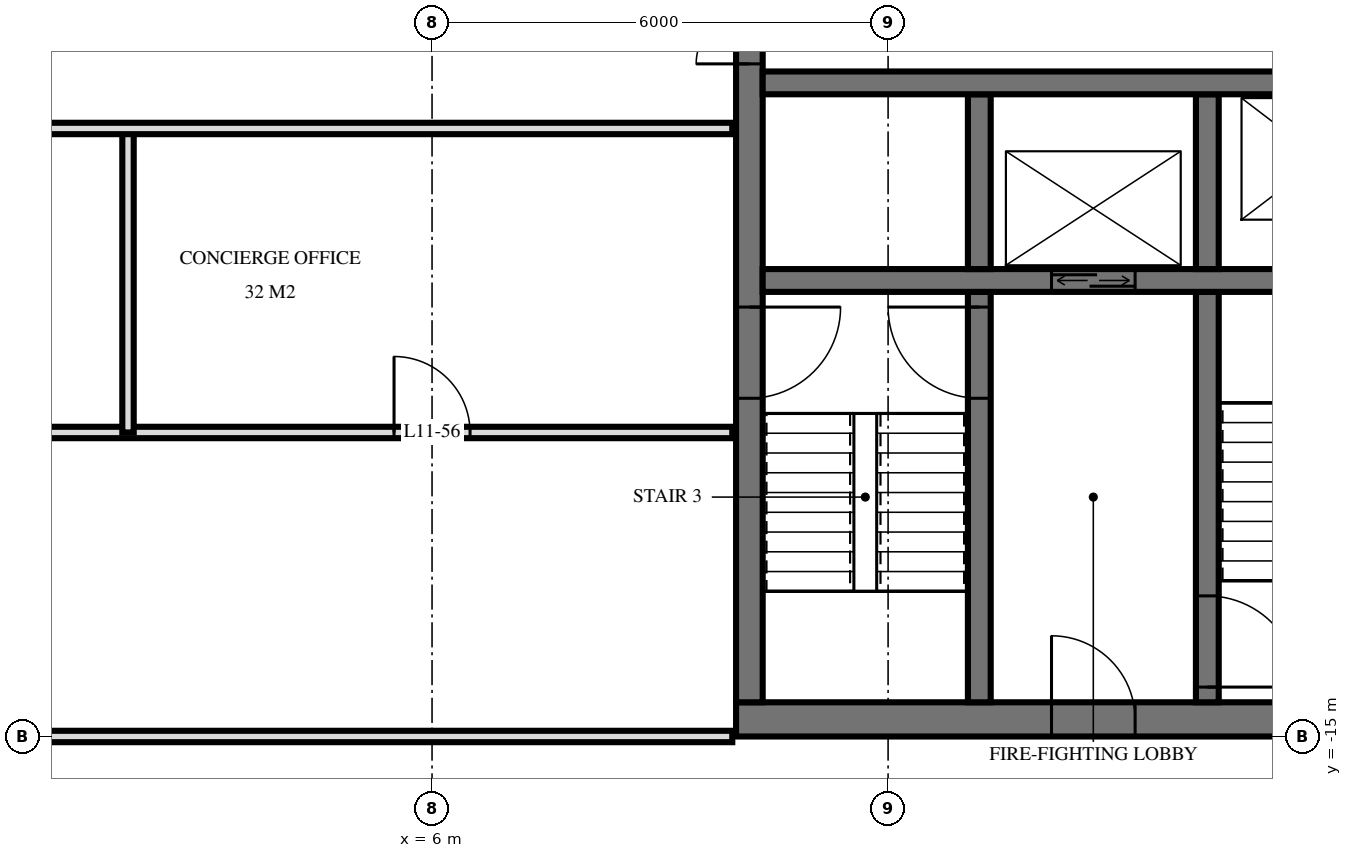
"""IFC4 building model, lengths in metres.
Left out: names, types, materials, properties, quantities, classifications, styles, units other than length and angle.
Written with IfcOpenShell. Run it as: python <this file> out.ifc"""

import sys

from ifc_helpers import new_model, si_unit, direction, frame, frame_2d, origin, place, context, subcontext, project, spatial, rectangle, extrude, element, fill, save


model = new_model("IFC4")
c1 = context("Model", 3, precision=1e-05, world=origin(), true_north=direction((0.0, 1.0)))
c2 = subcontext(c1, "Body", "Model", "MODEL_VIEW")
j1 = project(units=[si_unit("LENGTHUNIT", "METRE"), si_unit("PLANEANGLEUNIT", "RADIAN")], contexts=[c1])
p1 = place(None, origin())
s1 = spatial("IfcSite", under=j1, at=p1, CompositionType="ELEMENT")
p2 = place(p1, origin())
s2 = spatial("IfcBuilding", under=s1, at=p2, CompositionType="ELEMENT")
p3 = place(p2, frame((0.0, 0.0, 49.2)))
s3 = spatial("IfcBuildingStorey", under=s2, at=p3, CompositionType="ELEMENT", Elevation=49.2)
p4 = place(p3, frame((10.0, -14.775, 0.0), z_axis=(0.0, 0.0, 1.0), x_axis=(1.0, 0.0, 0.0)))
e1 = element("IfcWall", 1, at=p4, inside=s3, PredefinedType="SHEAR", context=c2, shape_type="SweptSolid", body=[
    extrude(rectangle(XDim=19.5, YDim=0.45, at=frame_2d((9.75, 0.0))), origin(), (0.0, 0.0, 1.0), 3.6),
])
p5 = place(p4, frame((7.1, 0.0, 0.0)))
e2 = element("IfcOpeningElement", 2, at=p5, cuts=e1, PredefinedType="OPENING", context=c2, shape_type="SweptSolid", body=[
    extrude(rectangle(XDim=1.2, YDim=2.1, at=frame_2d((0.6, 1.05))), frame((0.0, 0.235, 0.0), z_axis=(0.0, -1.0, 0.0), x_axis=(1.0, 0.0, 0.0)), (0.0, 0.0, 1.0), 0.47),
])
p6 = place(p4, frame((4.15, 0.0, 0.0)))
e3 = element("IfcOpeningElement", 3, at=p6, cuts=e1, PredefinedType="OPENING", context=c2, shape_type="SweptSolid", body=[
    extrude(rectangle(XDim=1.1, YDim=2.1, at=frame_2d((0.55, 1.05))), frame((0.0, 0.235, 0.0), z_axis=(0.0, -1.0, 0.0), x_axis=(1.0, 0.0, 0.0)), (0.0, 0.0, 1.0), 0.47),
])
p7 = place(p4, frame((10.1, 0.0, 0.0)))
e4 = element("IfcOpeningElement", 4, at=p7, cuts=e1, PredefinedType="OPENING", context=c2, shape_type="SweptSolid", body=[
    extrude(rectangle(XDim=0.9, YDim=2.1, at=frame_2d((0.45, 1.05))), frame((0.0, 0.235, 0.0), z_axis=(0.0, -1.0, 0.0), x_axis=(1.0, 0.0, 0.0)), (0.0, 0.0, 1.0), 0.47),
])
p8 = place(p4, frame((12.45, 0.0, 0.0)))
e5 = element("IfcOpeningElement", 5, at=p8, cuts=e1, PredefinedType="OPENING", context=c2, shape_type="SweptSolid", body=[
    extrude(rectangle(XDim=1.0, YDim=2.1, at=frame_2d((0.5, 1.05))), frame((0.0, 0.235, 0.0), z_axis=(0.0, -1.0, 0.0), x_axis=(1.0, 0.0, 0.0)), (0.0, 0.0, 1.0), 0.47),
])
p9 = place(p4, frame((14.913, 0.0, 0.0)))
e6 = element("IfcOpeningElement", 6, at=p9, cuts=e1, PredefinedType="OPENING", context=c2, shape_type="SweptSolid", body=[
    extrude(rectangle(XDim=1.0, YDim=2.1, at=frame_2d((0.5, 1.05))), frame((0.0, 0.235, 0.0), z_axis=(0.0, -1.0, 0.0), x_axis=(1.0, 0.0, 0.0)), (0.0, 0.0, 1.0), 0.47),
])
p10 = place(p4, frame((16.65, 0.0, 0.0)))
e7 = element("IfcOpeningElement", 7, at=p10, cuts=e1, PredefinedType="OPENING", context=c2, shape_type="SweptSolid", body=[
    extrude(rectangle(XDim=1.0, YDim=2.1, at=frame_2d((0.5, 1.05))), frame((0.0, 0.235, 0.0), z_axis=(0.0, -1.0, 0.0), x_axis=(1.0, 0.0, 0.0)), (0.0, 0.0, 1.0), 0.47),
])
p11 = place(p4, frame((18.025, 0.0, 0.0)))
e8 = element("IfcOpeningElement", 8, at=p11, cuts=e1, PredefinedType="OPENING", context=c2, shape_type="SweptSolid", body=[
    extrude(rectangle(XDim=1.0, YDim=2.1, at=frame_2d((0.5, 1.05))), frame((0.0, 0.235, 0.0), z_axis=(0.0, -1.0, 0.0), x_axis=(1.0, 0.0, 0.0)), (0.0, 0.0, 1.0), 0.47),
])
p12 = place(p3, frame((10.175, -14.55, 0.0), z_axis=(0.0, 0.0, 1.0), x_axis=(0.0, 1.0, 0.0)))
e9 = element("IfcWall", 9, at=p12, inside=s3, PredefinedType="SHEAR", context=c2, shape_type="SweptSolid", body=[
    extrude(rectangle(XDim=14.1, YDim=0.35, at=frame_2d((7.05, 0.0))), origin(), (0.0, 0.0, 1.0), 3.6),
])
p13 = place(p12, frame((8.4, 0.0, 0.0)))
e10 = element("IfcOpeningElement", 10, at=p13, cuts=e9, PredefinedType="OPENING", context=c2, shape_type="SweptSolid", body=[
    extrude(rectangle(XDim=1.4, YDim=2.4, at=frame_2d((0.7, 1.2))), frame((0.0, 0.185, 0.0), z_axis=(0.0, -1.0, 0.0), x_axis=(1.0, 0.0, 0.0)), (0.0, 0.0, 1.0), 0.37),
])
p14 = place(p12, frame((10.0, 0.0, 0.0)))
e11 = element("IfcOpeningElement", 11, at=p14, cuts=e9, PredefinedType="OPENING", context=c2, shape_type="SweptSolid", body=[
    extrude(rectangle(XDim=1.4, YDim=2.4, at=frame_2d((0.7, 1.2))), frame((0.0, 0.185, 0.0), z_axis=(0.0, -1.0, 0.0), x_axis=(1.0, 0.0, 0.0)), (0.0, 0.0, 1.0), 0.37),
])
p15 = place(p12, frame((4.0, 0.0, 0.0)))
e12 = element("IfcOpeningElement", 12, at=p15, cuts=e9, PredefinedType="OPENING", context=c2, shape_type="SweptSolid", body=[
    extrude(rectangle(XDim=1.2, YDim=2.1, at=frame_2d((0.6, 1.05))), frame((0.0, 0.185, 0.0), z_axis=(0.0, -1.0, 0.0), x_axis=(1.0, 0.0, 0.0)), (0.0, 0.0, 1.0), 0.37),
])
p16 = place(p3, frame((10.35, -6.4, 0.0), z_axis=(0.0, 0.0, 1.0), x_axis=(1.0, 0.0, 0.0)))
e13 = element("IfcWall", 13, at=p16, inside=s3, PredefinedType="SHEAR", context=c2, shape_type="SweptSolid", body=[
    extrude(rectangle(XDim=18.7, YDim=0.3, at=frame_2d((9.35, 0.0))), origin(), (0.0, 0.0, 1.0), 3.6),
])
p17 = place(p16, frame((14.65, 0.0, 0.0)))
e14 = element("IfcOpeningElement", 14, at=p17, cuts=e13, PredefinedType="OPENING", context=c2, shape_type="SweptSolid", body=[
    extrude(rectangle(XDim=1.1, YDim=2.1, at=frame_2d((0.55, 1.05))), frame((0.0, 0.16, 0.0), z_axis=(0.0, -1.0, 0.0), x_axis=(1.0, 0.0, 0.0)), (0.0, 0.0, 1.0), 0.32),
])
p18 = place(p16, frame((17.05, 0.0, 0.0)))
e15 = element("IfcOpeningElement", 15, at=p18, cuts=e13, PredefinedType="OPENING", context=c2, shape_type="SweptSolid", body=[
    extrude(rectangle(XDim=1.1, YDim=2.1, at=frame_2d((0.55, 1.05))), frame((0.0, 0.16, 0.0), z_axis=(0.0, -1.0, 0.0), x_axis=(1.0, 0.0, 0.0)), (0.0, 0.0, 1.0), 0.32),
])
p19 = place(p16, frame((6.8, 0.0, 0.0)))
e16 = element("IfcOpeningElement", 16, at=p19, cuts=e13, PredefinedType="OPENING", context=c2, shape_type="SweptSolid", body=[
    extrude(rectangle(XDim=1.1, YDim=2.1, at=frame_2d((0.55, 1.05))), frame((0.0, 0.16, 0.0), z_axis=(0.0, -1.0, 0.0), x_axis=(1.0, 0.0, 0.0)), (0.0, 0.0, 1.0), 0.32),
])
p20 = place(p16, frame((12.1, 0.0, 0.0)))
e17 = element("IfcOpeningElement", 17, at=p20, cuts=e13, PredefinedType="OPENING", context=c2, shape_type="SweptSolid", body=[
    extrude(rectangle(XDim=1.0, YDim=2.1, at=frame_2d((0.5, 1.05))), frame((0.0, 0.16, 0.0), z_axis=(0.0, -1.0, 0.0), x_axis=(1.0, 0.0, 0.0)), (0.0, 0.0, 1.0), 0.32),
])
p21 = place(p3, frame((10.35, -9.0, 0.0), z_axis=(0.0, 0.0, 1.0), x_axis=(1.0, 0.0, 0.0)))
e18 = element("IfcWall", 18, at=p21, inside=s3, PredefinedType="SHEAR", context=c2, shape_type="SweptSolid", body=[
    extrude(rectangle(XDim=18.7, YDim=0.3, at=frame_2d((9.35, 0.0))), origin(), (0.0, 0.0, 1.0), 3.6),
])
p22 = place(p21, frame((3.8, 0.0, 0.0)))
e19 = element("IfcOpeningElement", 19, at=p22, cuts=e18, PredefinedType="OPENING", context=c2, shape_type="SweptSolid", body=[
    extrude(rectangle(XDim=1.1, YDim=2.1, at=frame_2d((0.55, 1.05))), frame((0.0, 0.16, 0.0), z_axis=(0.0, -1.0, 0.0), x_axis=(1.0, 0.0, 0.0)), (0.0, 0.0, 1.0), 0.32),
])
p23 = place(p3, frame((13.2, -8.85, 0.0), z_axis=(0.0, 0.0, 1.0), x_axis=(0.0, 1.0, 0.0)))
e20 = element("IfcWall", 20, at=p23, inside=s3, PredefinedType="SHEAR", context=c2, shape_type="SweptSolid", body=[
    extrude(rectangle(XDim=2.3, YDim=0.3, at=frame_2d((1.15, 0.0))), origin(), (0.0, 0.0, 1.0), 3.6),
])
p24 = place(p3, frame((13.2, -14.55, 0.0), z_axis=(0.0, 0.0, 1.0), x_axis=(0.0, 1.0, 0.0)))
e21 = element("IfcWall", 21, at=p24, inside=s3, PredefinedType="SHEAR", context=c2, shape_type="SweptSolid", body=[
    extrude(rectangle(XDim=5.4, YDim=0.3, at=frame_2d((2.7, 0.0))), origin(), (0.0, 0.0, 1.0), 3.6),
])
p25 = place(p24, frame((4.0, 0.0, 0.0)))
e22 = element("IfcOpeningElement", 22, at=p25, cuts=e21, PredefinedType="OPENING", context=c2, shape_type="SweptSolid", body=[
    extrude(rectangle(XDim=1.2, YDim=2.1, at=frame_2d((0.6, 1.05))), frame((0.0, 0.16, 0.0), z_axis=(0.0, -1.0, 0.0), x_axis=(1.0, 0.0, 0.0)), (0.0, 0.0, 1.0), 0.32),
])
p26 = place(p3, frame((16.2, -8.85, 0.0), z_axis=(0.0, 0.0, 1.0), x_axis=(0.0, 1.0, 0.0)))
e23 = element("IfcWall", 23, at=p26, inside=s3, PredefinedType="SHEAR", context=c2, shape_type="SweptSolid", body=[
    extrude(rectangle(XDim=2.3, YDim=0.3, at=frame_2d((1.15, 0.0))), origin(), (0.0, 0.0, 1.0), 3.6),
])
p27 = place(p3, frame((16.2, -14.55, 0.0), z_axis=(0.0, 0.0, 1.0), x_axis=(0.0, 1.0, 0.0)))
e24 = element("IfcWall", 24, at=p27, inside=s3, PredefinedType="SHEAR", context=c2, shape_type="SweptSolid", body=[
    extrude(rectangle(XDim=5.4, YDim=0.3, at=frame_2d((2.7, 0.0))), origin(), (0.0, 0.0, 1.0), 3.6),
])
p28 = place(p27, frame((0.2, 0.0, 0.0)))
e25 = element("IfcOpeningElement", 25, at=p28, cuts=e24, PredefinedType="OPENING", context=c2, shape_type="SweptSolid", body=[
    extrude(rectangle(XDim=1.2, YDim=2.1, at=frame_2d((0.6, 1.05))), frame((0.0, 0.16, 0.0), z_axis=(0.0, -1.0, 0.0), x_axis=(1.0, 0.0, 0.0)), (0.0, 0.0, 1.0), 0.32),
])
p29 = place(p3, frame((2.0, -11.0, 0.0), z_axis=(0.0, 0.0, 1.0), x_axis=(0.0, 1.0, 0.0)))
e26 = element("IfcWall", 26, at=p29, inside=s3, PredefinedType="PARTITIONING", context=c2, shape_type="SweptSolid", body=[
    extrude(rectangle(XDim=4.0, YDim=0.15, at=frame_2d((2.0, 0.0))), origin(), (0.0, 0.0, 1.0), 3.32),
])
p30 = place(p3, frame((-9.95, -15.0, 0.0), z_axis=(0.0, 0.0, 1.0), x_axis=(1.0, 0.0, 0.0)))
e27 = element("IfcWall", 27, at=p30, inside=s3, PredefinedType="PARTITIONING", context=c2, shape_type="SweptSolid", body=[
    extrude(rectangle(XDim=19.9, YDim=0.15, at=frame_2d((9.95, 0.0))), origin(), (0.0, 0.0, 1.0), 2.684),
])
p31 = place(p30, frame((9.45, 0.0, 0.0)))
e28 = element("IfcOpeningElement", 28, at=p31, cuts=e27, PredefinedType="OPENING", context=c2, shape_type="SweptSolid", body=[
    extrude(rectangle(XDim=1.0, YDim=2.1, at=frame_2d((0.5, 1.05))), frame((0.0, 0.085, 0.0), z_axis=(0.0, -1.0, 0.0), x_axis=(1.0, 0.0, 0.0)), (0.0, 0.0, 1.0), 0.17),
])
p32 = place(p3, frame((-9.95, -11.0, 0.0), z_axis=(0.0, 0.0, 1.0), x_axis=(1.0, 0.0, 0.0)))
e29 = element("IfcWall", 29, at=p32, inside=s3, PredefinedType="PARTITIONING", context=c2, shape_type="SweptSolid", body=[
    extrude(rectangle(XDim=19.9, YDim=0.15, at=frame_2d((9.95, 0.0))), origin(), (0.0, 0.0, 1.0), 3.32),
])
p33 = place(p32, frame((9.45, 0.0, 0.0)))
e30 = element("IfcOpeningElement", 30, at=p33, cuts=e29, PredefinedType="OPENING", context=c2, shape_type="SweptSolid", body=[
    extrude(rectangle(XDim=1.0, YDim=2.1, at=frame_2d((0.5, 1.05))), frame((0.0, 0.085, 0.0), z_axis=(0.0, -1.0, 0.0), x_axis=(1.0, 0.0, 0.0)), (0.0, 0.0, 1.0), 0.17),
])
p34 = place(p32, frame((15.45, 0.0, 0.0)))
e31 = element("IfcOpeningElement", 31, at=p34, cuts=e29, PredefinedType="OPENING", context=c2, shape_type="SweptSolid", body=[
    extrude(rectangle(XDim=1.0, YDim=2.1, at=frame_2d((0.5, 1.05))), frame((0.0, 0.085, 0.0), z_axis=(0.0, -1.0, 0.0), x_axis=(1.0, 0.0, 0.0)), (0.0, 0.0, 1.0), 0.17),
])
p35 = place(p3, frame((-9.95, -7.0, 0.0), z_axis=(0.0, 0.0, 1.0), x_axis=(1.0, 0.0, 0.0)))
e32 = element("IfcWall", 32, at=p35, inside=s3, PredefinedType="PARTITIONING", context=c2, shape_type="SweptSolid", body=[
    extrude(rectangle(XDim=19.9, YDim=0.15, at=frame_2d((9.95, 0.0))), origin(), (0.0, 0.0, 1.0), 3.32),
])
p36 = place(p35, frame((9.45, 0.0, 0.0)))
e33 = element("IfcOpeningElement", 33, at=p36, cuts=e32, PredefinedType="OPENING", context=c2, shape_type="SweptSolid", body=[
    extrude(rectangle(XDim=1.0, YDim=2.1, at=frame_2d((0.5, 1.05))), frame((0.0, 0.085, 0.0), z_axis=(0.0, -1.0, 0.0), x_axis=(1.0, 0.0, 0.0)), (0.0, 0.0, 1.0), 0.17),
])
p37 = place(p35, frame((3.45, 0.0, 0.0)))
e34 = element("IfcOpeningElement", 34, at=p37, cuts=e32, PredefinedType="OPENING", context=c2, shape_type="SweptSolid", body=[
    extrude(rectangle(XDim=1.0, YDim=2.1, at=frame_2d((0.5, 1.05))), frame((0.0, 0.085, 0.0), z_axis=(0.0, -1.0, 0.0), x_axis=(1.0, 0.0, 0.0)), (0.0, 0.0, 1.0), 0.17),
])
p38 = place(p22, origin())
e35 = element("IfcDoor", 35, at=p38, inside=s3, OperationType="DOUBLE_DOOR_SLIDING", PredefinedType="USERDEFINED", context=c2, shape_type="SweptSolid", body=[
    extrude(rectangle(XDim=1.1, YDim=2.1, at=frame_2d((0.55, 1.05))), frame((0.0, 0.025, 0.0), z_axis=(0.0, -1.0, 0.0), x_axis=(1.0, 0.0, 0.0)), (0.0, 0.0, 1.0), 0.05),
])
fill(e19, e35)
p39 = place(p13, origin())
e36 = element("IfcDoor", 36, at=p39, inside=s3, OperationType="DOUBLE_DOOR_SINGLE_SWING", PredefinedType="DOOR", context=c2, shape_type="SweptSolid", body=[
    extrude(rectangle(XDim=1.4, YDim=2.4, at=frame_2d((0.7, 1.2))), frame((0.0, 0.025, 0.0), z_axis=(0.0, -1.0, 0.0), x_axis=(1.0, 0.0, 0.0)), (0.0, 0.0, 1.0), 0.05),
])
fill(e10, e36)
p40 = place(p15, frame((0.6, 0.0, 0.0), z_axis=(0.0, 0.0, 1.0), x_axis=(-1.0, 0.0, 0.0)))
e37 = element("IfcDoor", 37, at=p40, inside=s3, OperationType="SINGLE_SWING_RIGHT", PredefinedType="DOOR", context=c2, shape_type="SweptSolid", body=[
    extrude(rectangle(XDim=1.2, YDim=2.1, at=frame_2d((0.0, 1.05))), frame((0.0, -0.025, 0.0), z_axis=(0.0, 1.0, 0.0), x_axis=(-1.0, 0.0, 0.0)), (0.0, 0.0, 1.0), 0.05),
])
fill(e12, e37)
p41 = place(p6, origin())
e38 = element("IfcDoor", 38, at=p41, inside=s3, OperationType="SINGLE_SWING_RIGHT", PredefinedType="DOOR", context=c2, shape_type="SweptSolid", body=[
    extrude(rectangle(XDim=1.1, YDim=2.1, at=frame_2d((0.55, 1.05))), frame((0.0, 0.025, 0.0), z_axis=(0.0, -1.0, 0.0), x_axis=(1.0, 0.0, 0.0)), (0.0, 0.0, 1.0), 0.05),
])
fill(e3, e38)
p42 = place(p25, origin())
e39 = element("IfcDoor", 39, at=p42, inside=s3, OperationType="SINGLE_SWING_LEFT", PredefinedType="DOOR", context=c2, shape_type="SweptSolid", body=[
    extrude(rectangle(XDim=1.2, YDim=2.1, at=frame_2d((0.6, 1.05))), frame((0.0, 0.025, 0.0), z_axis=(0.0, -1.0, 0.0), x_axis=(1.0, 0.0, 0.0)), (0.0, 0.0, 1.0), 0.05),
])
fill(e22, e39)
p43 = place(p28, frame((0.6, 0.0, 0.0), z_axis=(0.0, 0.0, 1.0), x_axis=(-1.0, 0.0, 0.0)))
e40 = element("IfcDoor", 40, at=p43, inside=s3, OperationType="SINGLE_SWING_LEFT", PredefinedType="DOOR", context=c2, shape_type="SweptSolid", body=[
    extrude(rectangle(XDim=1.2, YDim=2.1, at=frame_2d((0.0, 1.05))), frame((0.0, -0.025, 0.0), z_axis=(0.0, 1.0, 0.0), x_axis=(-1.0, 0.0, 0.0)), (0.0, 0.0, 1.0), 0.05),
])
fill(e25, e40)
p44 = place(p34, origin())
e41 = element("IfcDoor", 41, at=p44, inside=s3, OperationType="SINGLE_SWING_RIGHT", PredefinedType="DOOR", context=c2, shape_type="SweptSolid", body=[
    extrude(rectangle(XDim=1.0, YDim=2.1, at=frame_2d((0.5, 1.05))), frame((0.0, 0.025, 0.0), z_axis=(0.0, -1.0, 0.0), x_axis=(1.0, 0.0, 0.0)), (0.0, 0.0, 1.0), 0.05),
])
fill(e31, e41)
save(model, sys.argv[1])
